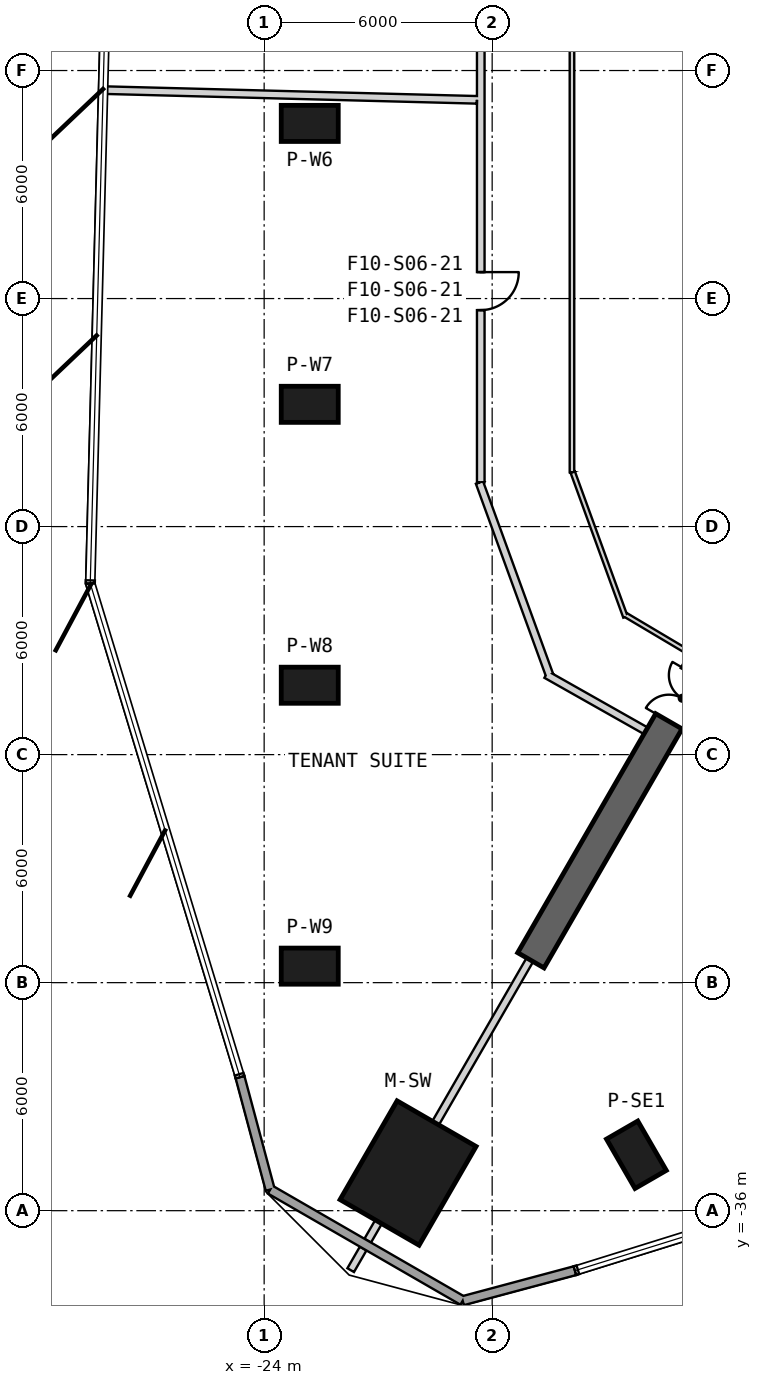
"""IFC4 building model, lengths in metres.
Left out: names, types, materials, properties, quantities, classifications, styles, units other than length and angle.
Written with IfcOpenShell. Run it as: python <this file> out.ifc"""

import sys

from ifc_helpers import new_model, si_unit, direction, frame, frame_2d, origin, origin_2d, place, context, subcontext, project, spatial, rectangle, extrude, element, fill, save


model = new_model("IFC4")
c1 = context("Model", 3, precision=1e-05, world=origin(), true_north=direction((0.0, 1.0)))
c2 = subcontext(c1, "Body", "Model", "MODEL_VIEW")
j1 = project(units=[si_unit("LENGTHUNIT", "METRE"), si_unit("PLANEANGLEUNIT", "RADIAN")], contexts=[c1])
p1 = place(None, origin())
s1 = spatial("IfcSite", under=j1, at=p1, CompositionType="ELEMENT")
p2 = place(p1, origin())
s2 = spatial("IfcBuilding", under=s1, at=p2, CompositionType="ELEMENT")
p3 = place(p2, frame((0.0, 0.0, 119.3)))
s3 = spatial("IfcBuildingStorey", under=s2, at=p3, CompositionType="ELEMENT", Elevation=119.3)
p4 = place(p3, frame((-20.213, -35.01, 0.0), z_axis=(0.0, 0.0, 1.0), x_axis=(-0.5, -0.866025403784, 0.0)))
e1 = element("IfcColumn", 1, at=p4, inside=s3, PredefinedType="COLUMN", context=c2, shape_type="SweptSolid", body=[
    extrude(rectangle(XDim=3.0, YDim=2.4, at=origin_2d()), origin(), (0.0, 0.0, 1.0), 4.1),
])
for number, where, z_axis, x_axis in (
    (2, (-22.8, -7.391, 0.0), (0.0, 0.0, 1.0), (-1.0, 0.0, 0.0)),
    (3, (-22.8, -14.783, 0.0), (0.0, 0.0, 1.0), (-1.0, 0.0, 0.0)),
    (4, (-22.8, -22.174, 0.0), (0.0, 0.0, 1.0), (-1.0, 0.0, 0.0)),
    (5, (-22.8, -29.566, 0.0), (0.0, 0.0, 1.0), (-1.0, 0.0, 0.0)),
    (6, (-14.205, -34.528, 0.0), (0.0, 0.0, 1.0), (0.5, -0.866, 0.0)),
):
    element("IfcColumn", number, at=place(p3, frame(where, z_axis=z_axis, x_axis=x_axis)), inside=s3, PredefinedType="COLUMN", context=c2, shape_type="SweptSolid", body=[
        extrude(rectangle(XDim=1.5, YDim=0.95, at=origin_2d()), origin(), (0.0, 0.0, 1.0), 4.1),
    ])
p5 = place(p3, frame((-10.575, -18.316, 0.0), z_axis=(0.0, 0.0, 1.0), x_axis=(-0.500008359956, -0.866020577108, 0.0)))
e7 = element("IfcWall", 7, at=p5, inside=s3, PredefinedType="SHEAR", context=c2, shape_type="SweptSolid", body=[
    extrude(rectangle(XDim=12.812, YDim=0.8, at=frame_2d((6.406, 0.0))), origin(), (0.0, 0.0, 1.0), 4.1),
])
p6 = place(p5, frame((4.15, 0.0, 0.0)))
e8 = element("IfcOpeningElement", 8, at=p6, cuts=e7, PredefinedType="OPENING", context=c2, shape_type="SweptSolid", body=[
    extrude(rectangle(XDim=1.4, YDim=2.4, at=frame_2d((0.7, 1.2))), frame((0.0, 0.41, 0.0), z_axis=(0.0, -1.0, 0.0), x_axis=(1.0, 0.0, 0.0)), (0.0, 0.0, 1.0), 0.82),
])
p7 = place(p3, frame((-24.635, -32.487, 0.0), z_axis=(0.0, 0.0, 1.0), x_axis=(0.258838355735, -0.965920651814, 0.0)))
e9 = element("IfcWall", 9, at=p7, inside=s3, PredefinedType="SOLIDWALL", context=c2, shape_type="SweptSolid", body=[
    extrude(rectangle(XDim=3.063, YDim=0.24, at=frame_2d((1.531, 0.0))), origin(), (0.0, 0.0, 1.0), 3.8),
])
p8 = place(p3, frame((-23.842, -35.445, 0.0), z_axis=(0.0, 0.0, 1.0), x_axis=(0.866031321059, -0.49998975084, 0.0)))
e10 = element("IfcWall", 10, at=p8, inside=s3, PredefinedType="SOLIDWALL", context=c2, shape_type="SweptSolid", body=[
    extrude(rectangle(XDim=5.851, YDim=0.24, at=frame_2d((2.925, 0.0))), origin(), (0.0, 0.0, 1.0), 3.8),
])
p9 = place(p3, frame((-18.775, -38.37, 0.0), z_axis=(0.0, 0.0, 1.0), x_axis=(0.965924175265, 0.258825206729, 0.0)))
e11 = element("IfcWall", 11, at=p9, inside=s3, PredefinedType="SOLIDWALL", context=c2, shape_type="SweptSolid", body=[
    extrude(rectangle(XDim=3.058, YDim=0.24, at=frame_2d((1.529, 0.0))), origin(), (0.0, 0.0, 1.0), 3.8),
])
p10 = place(p3, frame((-15.9, 16.451, 0.0), z_axis=(0.0, 0.0, 1.0), x_axis=(0.0, -1.0, 0.0)))
e12 = element("IfcWall", 12, at=p10, inside=s3, PredefinedType="PARTITIONING", context=c2, shape_type="SweptSolid", body=[
    extrude(rectangle(XDim=33.022, YDim=0.12, at=frame_2d((16.511, 0.0))), origin(), (0.0, 0.0, 1.0), 2.98),
])
p11 = place(p10, frame((15.981, 0.0, 0.0)))
e13 = element("IfcOpeningElement", 13, at=p11, cuts=e12, PredefinedType="OPENING", context=c2, shape_type="SweptSolid", body=[
    extrude(rectangle(XDim=1.0, YDim=2.1, at=frame_2d((0.5, 1.05))), frame((0.0, 0.07, 0.0), z_axis=(0.0, -1.0, 0.0), x_axis=(1.0, 0.0, 0.0)), (0.0, 0.0, 1.0), 0.14),
])
p12 = place(p3, frame((-15.879, -16.567, 0.0), z_axis=(0.0, 0.0, 1.0), x_axis=(0.341999322503, -0.939700198685, 0.0)))
e14 = element("IfcWall", 14, at=p12, inside=s3, PredefinedType="PARTITIONING", context=c2, shape_type="SweptSolid", body=[
    extrude(rectangle(XDim=4.054, YDim=0.12, at=frame_2d((2.027, 0.0))), origin(), (0.0, 0.0, 1.0), 2.88),
])
p13 = place(p3, frame((-14.494, -20.322, 0.0), z_axis=(0.0, 0.0, 1.0), x_axis=(0.859745408261, -0.510722853389, 0.0)))
e15 = element("IfcWall", 15, at=p13, inside=s3, PredefinedType="PARTITIONING", context=c2, shape_type="SweptSolid", body=[
    extrude(rectangle(XDim=1.991, YDim=0.12, at=frame_2d((0.996, 0.0))), origin(), (0.0, 0.0, 1.0), 3.8),
])
p14 = place(p3, frame((-16.576, -21.892, 0.0), z_axis=(0.0, 0.0, 1.0), x_axis=(0.870559817111, -0.492062602553, 0.0)))
e16 = element("IfcWall", 16, at=p14, inside=s3, PredefinedType="PARTITIONING", context=c2, shape_type="SweptSolid", body=[
    extrude(rectangle(XDim=3.01, YDim=0.2, at=frame_2d((1.505, 0.0))), origin(), (0.0, 0.0, 1.0), 3.8),
])
p15 = place(p3, frame((-18.334, -16.84, 0.0), z_axis=(0.0, 0.0, 1.0), x_axis=(0.342015877493, -0.939694173411, 0.0)))
e17 = element("IfcWall", 17, at=p15, inside=s3, PredefinedType="PARTITIONING", context=c2, shape_type="SweptSolid", body=[
    extrude(rectangle(XDim=5.389, YDim=0.2, at=frame_2d((2.694, 0.0))), origin(), (0.0, 0.0, 1.0), 2.88),
])
p16 = place(p3, frame((-18.3, 10.13, 0.0), z_axis=(0.0, 0.0, 1.0), x_axis=(0.0, -1.0, 0.0)))
e18 = element("IfcWall", 18, at=p16, inside=s3, PredefinedType="PARTITIONING", context=c2, shape_type="SweptSolid", body=[
    extrude(rectangle(XDim=26.964, YDim=0.2, at=frame_2d((13.482, 0.0))), origin(), (0.0, 0.0, 1.0), 3.08),
])
p17 = place(p16, frame((21.434, 0.0, 0.0)))
e19 = element("IfcOpeningElement", 19, at=p17, cuts=e18, PredefinedType="OPENING", context=c2, shape_type="SweptSolid", body=[
    extrude(rectangle(XDim=1.0, YDim=2.1, at=frame_2d((0.5, 1.05))), frame((0.0, 0.11, 0.0), z_axis=(0.0, -1.0, 0.0), x_axis=(1.0, 0.0, 0.0)), (0.0, 0.0, 1.0), 0.22),
])
p18 = place(p16, frame((7.952, 0.0, 0.0)))
e20 = element("IfcOpeningElement", 20, at=p18, cuts=e18, PredefinedType="OPENING", context=c2, shape_type="SweptSolid", body=[
    extrude(rectangle(XDim=1.0, YDim=2.1, at=frame_2d((0.5, 1.05))), frame((0.0, 0.11, 0.0), z_axis=(0.0, -1.0, 0.0), x_axis=(1.0, 0.0, 0.0)), (0.0, 0.0, 1.0), 0.22),
])
p19 = place(p3, frame((-18.4, -6.771, 0.0), z_axis=(0.0, 0.0, 1.0), x_axis=(-0.999660021388, 0.026073772986, 0.0)))
e21 = element("IfcWall", 21, at=p19, inside=s3, PredefinedType="PARTITIONING", context=c2, shape_type="SweptSolid", body=[
    extrude(rectangle(XDim=9.841, YDim=0.2, at=frame_2d((4.92, 0.0))), origin(), (0.0, 0.0, 1.0), 3.08),
])
p20 = place(p3, frame((-17.007, -29.397, 0.0), z_axis=(0.0, 0.0, 1.0), x_axis=(-0.500006314404, -0.866021758131, 0.0)))
e22 = element("IfcWall", 22, at=p20, inside=s3, PredefinedType="PARTITIONING", context=c2, shape_type="SweptSolid", body=[
    extrude(rectangle(XDim=4.963, YDim=0.2, at=frame_2d((2.482, 0.0))), origin(), (0.0, 0.0, 1.0), 3.37),
])
p21 = place(p3, frame((-20.989, -36.293, 0.0), z_axis=(0.0, 0.0, 1.0), x_axis=(-0.499857944771, -0.866107403877, 0.0)))
e23 = element("IfcWall", 23, at=p21, inside=s3, PredefinedType="PARTITIONING", context=c2, shape_type="SweptSolid", body=[
    extrude(rectangle(XDim=0.572, YDim=0.2, at=frame_2d((0.286, 0.0))), origin(), (0.0, 0.0, 1.0), 3.8),
])
p22 = place(p3, frame((-21.395, -36.997, 0.0), z_axis=(0.0, 0.0, 1.0), x_axis=(-0.499862072928, -0.866105021373, 0.0)))
e24 = element("IfcWall", 24, at=p22, inside=s3, PredefinedType="PARTITIONING", context=c2, shape_type="SweptSolid", body=[
    extrude(rectangle(XDim=0.656, YDim=0.2, at=frame_2d((0.328, 0.0))), origin(), (0.0, 0.0, 1.0), 3.8),
])
p23 = place(p17, origin())
e25 = element("IfcDoor", 25, at=p23, inside=s3, OperationType="SINGLE_SWING_LEFT", PredefinedType="USERDEFINED", context=c2, shape_type="SweptSolid", body=[
    extrude(rectangle(XDim=1.0, YDim=2.1, at=frame_2d((0.5, 1.05))), frame((0.0, 0.025, 0.0), z_axis=(0.0, -1.0, 0.0), x_axis=(1.0, 0.0, 0.0)), (0.0, 0.0, 1.0), 0.05),
])
fill(e19, e25)
p24 = place(p6, origin())
e26 = element("IfcDoor", 26, at=p24, inside=s3, OperationType="DOUBLE_DOOR_SINGLE_SWING", PredefinedType="NOTDEFINED", context=c2, shape_type="SweptSolid", body=[
    extrude(rectangle(XDim=1.4, YDim=2.4, at=frame_2d((0.7, 1.2))), frame((0.0, 0.025, 0.0), z_axis=(0.0, -1.0, 0.0), x_axis=(1.0, 0.0, 0.0)), (0.0, 0.0, 1.0), 0.05),
])
fill(e8, e26)
save(model, sys.argv[1])
